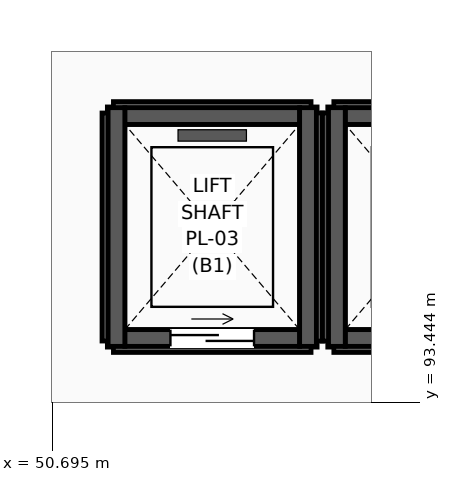
"""IFC4 building model, lengths in metres.
Left out: names, types, materials, properties, quantities, classifications, styles, units other than length and angle.
Written with IfcOpenShell. Run it as: python <this file> out.ifc"""

import sys

from ifc_helpers import new_model, si_unit, direction, frame, frame_2d, origin, place, context, subcontext, project, spatial, rectangle, extrude, element, fill, save


model = new_model("IFC4")
c1 = context("Model", 3, precision=1e-05, world=origin(), true_north=direction((0.0, 1.0)))
c2 = subcontext(c1, "Body", "Model", "MODEL_VIEW")
j1 = project(units=[si_unit("LENGTHUNIT", "METRE"), si_unit("PLANEANGLEUNIT", "RADIAN")], contexts=[c1])
p1 = place(None, origin())
s1 = spatial("IfcSite", under=j1, at=p1, CompositionType="ELEMENT")
p2 = place(p1, origin())
s2 = spatial("IfcBuilding", under=s1, at=p2, CompositionType="ELEMENT")
p3 = place(p2, frame((0.0, 0.0, -4.8)))
s3 = spatial("IfcBuildingStorey", under=s2, at=p3, CompositionType="ELEMENT", Elevation=-4.8)
p4 = place(p3, frame((51.5, 94.25, -1.2), z_axis=(0.0, 0.0, 1.0), x_axis=(1.0, 0.0, 0.0)))
e1 = element("IfcWall", 1, at=p4, inside=s3, PredefinedType="USERDEFINED", context=c2, shape_type="SweptSolid", body=[
    extrude(rectangle(XDim=2.6, YDim=0.3, at=frame_2d((1.3, 0.0))), origin(), (0.0, 0.0, 1.0), 1.2),
])
p5 = place(p3, frame((54.1, 94.25, -1.2), z_axis=(0.0, 0.0, 1.0), x_axis=(0.0, 1.0, 0.0)))
e2 = element("IfcWall", 2, at=p5, inside=s3, PredefinedType="USERDEFINED", context=c2, shape_type="SweptSolid", body=[
    extrude(rectangle(XDim=3.0, YDim=0.3, at=frame_2d((1.5, 0.0))), origin(), (0.0, 0.0, 1.0), 1.2),
])
p6 = place(p3, frame((54.1, 97.25, -1.2), z_axis=(0.0, 0.0, 1.0), x_axis=(-1.0, 0.0, 0.0)))
e3 = element("IfcWall", 3, at=p6, inside=s3, PredefinedType="USERDEFINED", context=c2, shape_type="SweptSolid", body=[
    extrude(rectangle(XDim=2.6, YDim=0.3, at=frame_2d((1.3, 0.0))), origin(), (0.0, 0.0, 1.0), 1.2),
])
p7 = place(p3, frame((51.5, 97.25, -1.2), z_axis=(0.0, 0.0, 1.0), x_axis=(0.0, -1.0, 0.0)))
e4 = element("IfcWall", 4, at=p7, inside=s3, PredefinedType="USERDEFINED", context=c2, shape_type="SweptSolid", body=[
    extrude(rectangle(XDim=3.0, YDim=0.3, at=frame_2d((1.5, 0.0))), origin(), (0.0, 0.0, 1.0), 1.2),
])
for number, where, z_axis, x_axis in (
    (5, (54.4, 94.25, -1.2), (0.0, 0.0, 1.0), (1.0, 0.0, 0.0)),
    (6, (57.0, 97.25, -1.2), (0.0, 0.0, 1.0), (-1.0, 0.0, 0.0)),
):
    element("IfcWall", number, at=place(p3, frame(where, z_axis=z_axis, x_axis=x_axis)), inside=s3, PredefinedType="USERDEFINED", context=c2, shape_type="SweptSolid", body=[
        extrude(rectangle(XDim=2.6, YDim=0.3, at=frame_2d((1.3, 0.0))), origin(), (0.0, 0.0, 1.0), 1.2),
    ])
p8 = place(p3, frame((54.4, 97.25, -1.2), z_axis=(0.0, 0.0, 1.0), x_axis=(0.0, -1.0, 0.0)))
e7 = element("IfcWall", 7, at=p8, inside=s3, PredefinedType="USERDEFINED", context=c2, shape_type="SweptSolid", body=[
    extrude(rectangle(XDim=3.0, YDim=0.3, at=frame_2d((1.5, 0.0))), origin(), (0.0, 0.0, 1.0), 1.2),
])
p9 = place(p3, frame((51.65, 94.29, 0.0), z_axis=(0.0, 0.0, 1.0), x_axis=(1.0, 0.0, 0.0)))
e8 = element("IfcWall", 8, at=p9, inside=s3, PredefinedType="SOLIDWALL", context=c2, shape_type="SweptSolid", body=[
    extrude(rectangle(XDim=2.3, YDim=0.22, at=frame_2d((1.15, 0.0))), origin(), (0.0, 0.0, 1.0), 4.48),
])
p10 = place(p9, frame((0.6, 0.0, 0.0)))
e9 = element("IfcOpeningElement", 9, at=p10, cuts=e8, PredefinedType="OPENING", context=c2, shape_type="SweptSolid", body=[
    extrude(rectangle(XDim=1.1, YDim=2.2, at=frame_2d((0.55, 1.1))), frame((0.0, 0.12, 0.0), z_axis=(0.0, -1.0, 0.0), x_axis=(1.0, 0.0, 0.0)), (0.0, 0.0, 1.0), 0.24),
])
p11 = place(p3, frame((51.65, 97.21, 0.0), z_axis=(0.0, 0.0, 1.0), x_axis=(1.0, 0.0, 0.0)))
e10 = element("IfcWall", 10, at=p11, inside=s3, PredefinedType="SOLIDWALL", context=c2, shape_type="SweptSolid", body=[
    extrude(rectangle(XDim=2.3, YDim=0.22, at=frame_2d((1.15, 0.0))), origin(), (0.0, 0.0, 1.0), 4.48),
])
for number, where, z_axis, x_axis in (
    (11, (51.54, 94.18, 0.0), (0.0, 0.0, 1.0), (0.0, 1.0, 0.0)),
    (12, (54.06, 94.18, 0.0), (0.0, 0.0, 1.0), (0.0, 1.0, 0.0)),
):
    element("IfcWall", number, at=place(p3, frame(where, z_axis=z_axis, x_axis=x_axis)), inside=s3, PredefinedType="SOLIDWALL", context=c2, shape_type="SweptSolid", body=[
        extrude(rectangle(XDim=3.14, YDim=0.22, at=frame_2d((1.57, 0.0))), origin(), (0.0, 0.0, 1.0), 4.48),
    ])
p12 = place(p3, frame((54.55, 94.29, 0.0), z_axis=(0.0, 0.0, 1.0), x_axis=(1.0, 0.0, 0.0)))
e13 = element("IfcWall", 13, at=p12, inside=s3, PredefinedType="SOLIDWALL", context=c2, shape_type="SweptSolid", body=[
    extrude(rectangle(XDim=2.3, YDim=0.22, at=frame_2d((1.15, 0.0))), origin(), (0.0, 0.0, 1.0), 4.48),
])
p13 = place(p12, frame((0.6, 0.0, 0.0)))
e14 = element("IfcOpeningElement", 14, at=p13, cuts=e13, PredefinedType="OPENING", context=c2, shape_type="SweptSolid", body=[
    extrude(rectangle(XDim=1.1, YDim=2.2, at=frame_2d((0.55, 1.1))), frame((0.0, 0.12, 0.0), z_axis=(0.0, -1.0, 0.0), x_axis=(1.0, 0.0, 0.0)), (0.0, 0.0, 1.0), 0.24),
])
p14 = place(p3, frame((54.55, 97.21, 0.0), z_axis=(0.0, 0.0, 1.0), x_axis=(1.0, 0.0, 0.0)))
e15 = element("IfcWall", 15, at=p14, inside=s3, PredefinedType="SOLIDWALL", context=c2, shape_type="SweptSolid", body=[
    extrude(rectangle(XDim=2.3, YDim=0.22, at=frame_2d((1.15, 0.0))), origin(), (0.0, 0.0, 1.0), 4.48),
])
p15 = place(p3, frame((54.44, 94.18, 0.0), z_axis=(0.0, 0.0, 1.0), x_axis=(0.0, 1.0, 0.0)))
e16 = element("IfcWall", 16, at=p15, inside=s3, PredefinedType="SOLIDWALL", context=c2, shape_type="SweptSolid", body=[
    extrude(rectangle(XDim=3.14, YDim=0.22, at=frame_2d((1.57, 0.0))), origin(), (0.0, 0.0, 1.0), 4.48),
])
p16 = place(p10, origin())
e17 = element("IfcDoor", 17, at=p16, inside=s3, OperationType="SLIDING_TO_LEFT", PredefinedType="DOOR", context=c2, shape_type="SweptSolid", body=[
    extrude(rectangle(XDim=1.1, YDim=2.2, at=frame_2d((0.55, 1.1))), frame((0.0, 0.025, 0.0), z_axis=(0.0, -1.0, 0.0), x_axis=(1.0, 0.0, 0.0)), (0.0, 0.0, 1.0), 0.05),
])
fill(e9, e17)
save(model, sys.argv[1])
